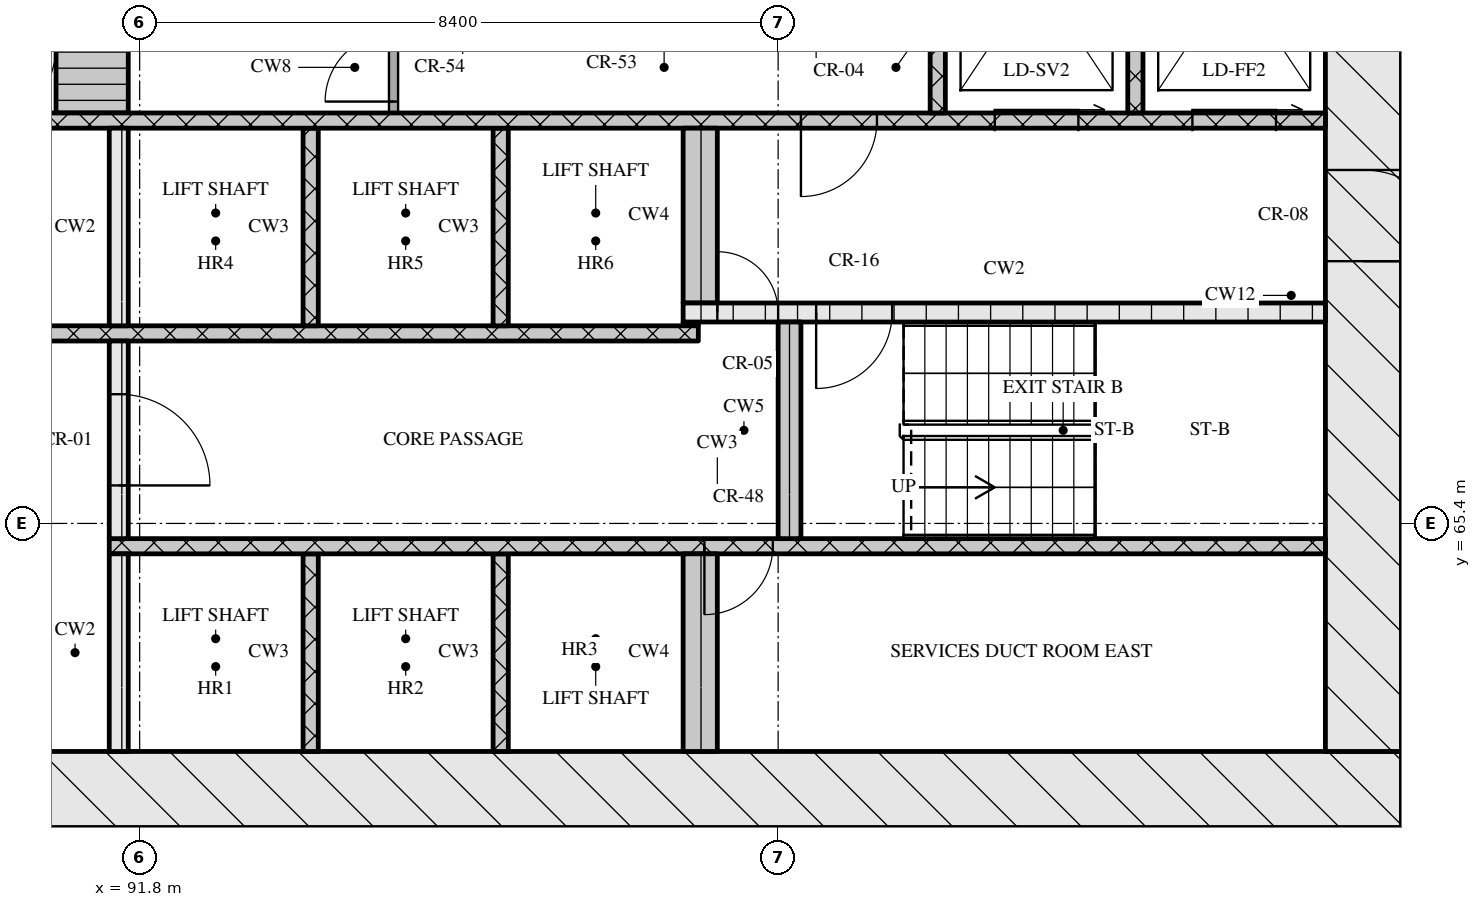
"""IFC4 building model, lengths in metres.
Left out: names, types, materials, properties, quantities, classifications, styles, units other than length and angle.
Written with IfcOpenShell. Run it as: python <this file> out.ifc"""

import sys

from ifc_helpers import new_model, si_unit, direction, frame, frame_2d, origin, place, context, subcontext, project, spatial, rectangle, extrude, element, fill, save


model = new_model("IFC4")
c1 = context("Model", 3, precision=1e-05, world=origin(), true_north=direction((0.0, 1.0)))
c2 = subcontext(c1, "Body", "Model", "MODEL_VIEW")
j1 = project(units=[si_unit("LENGTHUNIT", "METRE"), si_unit("PLANEANGLEUNIT", "RADIAN")], contexts=[c1])
p1 = place(None, origin())
s1 = spatial("IfcSite", under=j1, at=p1, CompositionType="ELEMENT")
p2 = place(p1, origin())
s2 = spatial("IfcBuilding", under=s1, at=p2, CompositionType="ELEMENT")
p3 = place(p2, frame((0.0, 0.0, 120.45)))
s3 = spatial("IfcBuildingStorey", under=s2, at=p3, CompositionType="ELEMENT", Elevation=120.45)
p4 = place(p3, frame((66.8, 61.9, 0.0), z_axis=(0.0, 0.0, 1.0), x_axis=(1.0, 0.0, 0.0)))
e1 = element("IfcWall", 1, at=p4, inside=s3, PredefinedType="SOLIDWALL", context=c2, shape_type="SweptSolid", body=[
    extrude(rectangle(XDim=41.6, YDim=1.0, at=frame_2d((20.8, 0.0))), origin(), (0.0, 0.0, 1.0), 3.32),
])
p5 = place(p4, frame((21.15, 0.0, 0.0)))
e2 = element("IfcOpeningElement", 2, at=p5, cuts=e1, PredefinedType="OPENING", context=c2, shape_type="SweptSolid", body=[
    extrude(rectangle(XDim=1.8, YDim=2.1, at=frame_2d((0.9, 1.05))), frame((0.0, 0.51, 0.0), z_axis=(0.0, -1.0, 0.0), x_axis=(1.0, 0.0, 0.0)), (0.0, 0.0, 1.0), 1.02),
])
p6 = place(p3, frame((107.9, 62.4, 0.0), z_axis=(0.0, 0.0, 1.0), x_axis=(0.0, 1.0, 0.0)))
e3 = element("IfcWall", 3, at=p6, inside=s3, PredefinedType="SOLIDWALL", context=c2, shape_type="SweptSolid", body=[
    extrude(rectangle(XDim=12.0, YDim=1.0, at=frame_2d((6.0, 0.0))), origin(), (0.0, 0.0, 1.0), 3.32),
])
p7 = place(p6, frame((6.45, 0.0, 0.0)))
e4 = element("IfcOpeningElement", 4, at=p7, cuts=e3, PredefinedType="OPENING", context=c2, shape_type="SweptSolid", body=[
    extrude(rectangle(XDim=1.2, YDim=2.1, at=frame_2d((0.6, 1.05))), frame((0.0, 0.51, 0.0), z_axis=(0.0, -1.0, 0.0), x_axis=(1.0, 0.0, 0.0)), (0.0, 0.0, 1.0), 1.02),
])
p8 = place(p3, frame((91.525, 62.4, 0.0), z_axis=(0.0, 0.0, 1.0), x_axis=(0.0, 1.0, 0.0)))
e5 = element("IfcWall", 5, at=p8, inside=s3, PredefinedType="SOLIDWALL", context=c2, shape_type="SweptSolid", body=[
    extrude(rectangle(XDim=2.6, YDim=0.25, at=frame_2d((1.3, 0.0))), origin(), (0.0, 0.0, 1.0), 3.32),
])
for number, where, z_axis, x_axis in (
    (6, (94.05, 62.4, 0.0), (0.0, 0.0, 1.0), (0.0, 1.0, 0.0)),
    (7, (96.55, 62.4, 0.0), (0.0, 0.0, 1.0), (0.0, 1.0, 0.0)),
):
    element("IfcWall", number, at=place(p3, frame(where, z_axis=z_axis, x_axis=x_axis)), inside=s3, PredefinedType="SOLIDWALL", context=c2, shape_type="SweptSolid", body=[
        extrude(rectangle(XDim=2.6, YDim=0.2, at=frame_2d((1.3, 0.0))), origin(), (0.0, 0.0, 1.0), 3.32),
    ])
p9 = place(p3, frame((99.175, 62.4, 0.0), z_axis=(0.0, 0.0, 1.0), x_axis=(0.0, 1.0, 0.0)))
e8 = element("IfcWall", 8, at=p9, inside=s3, PredefinedType="SOLIDWALL", context=c2, shape_type="SweptSolid", body=[
    extrude(rectangle(XDim=2.6, YDim=0.45, at=frame_2d((1.3, 0.0))), origin(), (0.0, 0.0, 1.0), 3.32),
])
p10 = place(p3, frame((91.4, 65.1, 0.0), z_axis=(0.0, 0.0, 1.0), x_axis=(1.0, 0.0, 0.0)))
e9 = element("IfcWall", 9, at=p10, inside=s3, PredefinedType="SOLIDWALL", context=c2, shape_type="SweptSolid", body=[
    extrude(rectangle(XDim=16.0, YDim=0.2, at=frame_2d((8.0, 0.0))), origin(), (0.0, 0.0, 1.0), 3.32),
])
p11 = place(p10, frame((7.83, 0.0, 0.0)))
e10 = element("IfcOpeningElement", 10, at=p11, cuts=e9, PredefinedType="OPENING", context=c2, shape_type="SweptSolid", body=[
    extrude(rectangle(XDim=0.9, YDim=2.1, at=frame_2d((0.45, 1.05))), frame((0.0, 0.11, 0.0), z_axis=(0.0, -1.0, 0.0), x_axis=(1.0, 0.0, 0.0)), (0.0, 0.0, 1.0), 0.22),
])
p12 = place(p3, frame((91.525, 65.2, 0.0), z_axis=(0.0, 0.0, 1.0), x_axis=(0.0, 1.0, 0.0)))
e11 = element("IfcWall", 11, at=p12, inside=s3, PredefinedType="SOLIDWALL", context=c2, shape_type="SweptSolid", body=[
    extrude(rectangle(XDim=2.6, YDim=0.25, at=frame_2d((1.3, 0.0))), origin(), (0.0, 0.0, 1.0), 3.32),
])
p13 = place(p12, frame((0.7, 0.0, 0.0)))
e12 = element("IfcOpeningElement", 12, at=p13, cuts=e11, PredefinedType="OPENING", context=c2, shape_type="SweptSolid", body=[
    extrude(rectangle(XDim=1.2, YDim=2.1, at=frame_2d((0.6, 1.05))), frame((0.0, 0.135, 0.0), z_axis=(0.0, -1.0, 0.0), x_axis=(1.0, 0.0, 0.0)), (0.0, 0.0, 1.0), 0.27),
])
p14 = place(p3, frame((100.35, 65.2, 0.0), z_axis=(0.0, 0.0, 1.0), x_axis=(0.0, 1.0, 0.0)))
e13 = element("IfcWall", 13, at=p14, inside=s3, PredefinedType="SOLIDWALL", context=c2, shape_type="SweptSolid", body=[
    extrude(rectangle(XDim=2.85, YDim=0.3, at=frame_2d((1.425, 0.0))), origin(), (0.0, 0.0, 1.0), 3.32),
])
p15 = place(p3, frame((76.05, 67.9, 0.0), z_axis=(0.0, 0.0, 1.0), x_axis=(1.0, 0.0, 0.0)))
e14 = element("IfcWall", 14, at=p15, inside=s3, PredefinedType="SOLIDWALL", context=c2, shape_type="SweptSolid", body=[
    extrude(rectangle(XDim=23.1, YDim=0.2, at=frame_2d((11.55, 0.0))), origin(), (0.0, 0.0, 1.0), 3.32),
])
p16 = place(p15, frame((0.6, 0.0, 0.0)))
e15 = element("IfcOpeningElement", 15, at=p16, cuts=e14, PredefinedType="OPENING", context=c2, shape_type="SweptSolid", body=[
    extrude(rectangle(XDim=1.1, YDim=2.1, at=frame_2d((0.55, 1.05))), frame((0.0, 0.11, 0.0), z_axis=(0.0, -1.0, 0.0), x_axis=(1.0, 0.0, 0.0)), (0.0, 0.0, 1.0), 0.22),
])
p17 = place(p15, frame((3.1, 0.0, 0.0)))
e16 = element("IfcOpeningElement", 16, at=p17, cuts=e14, PredefinedType="OPENING", context=c2, shape_type="SweptSolid", body=[
    extrude(rectangle(XDim=1.1, YDim=2.1, at=frame_2d((0.55, 1.05))), frame((0.0, 0.11, 0.0), z_axis=(0.0, -1.0, 0.0), x_axis=(1.0, 0.0, 0.0)), (0.0, 0.0, 1.0), 0.22),
])
p18 = place(p15, frame((5.6, 0.0, 0.0)))
e17 = element("IfcOpeningElement", 17, at=p18, cuts=e14, PredefinedType="OPENING", context=c2, shape_type="SweptSolid", body=[
    extrude(rectangle(XDim=1.1, YDim=2.1, at=frame_2d((0.55, 1.05))), frame((0.0, 0.11, 0.0), z_axis=(0.0, -1.0, 0.0), x_axis=(1.0, 0.0, 0.0)), (0.0, 0.0, 1.0), 0.22),
])
p19 = place(p15, frame((8.45, 0.0, 0.0)))
e18 = element("IfcOpeningElement", 18, at=p19, cuts=e14, PredefinedType="OPENING", context=c2, shape_type="SweptSolid", body=[
    extrude(rectangle(XDim=0.9, YDim=2.1, at=frame_2d((0.45, 1.05))), frame((0.0, 0.11, 0.0), z_axis=(0.0, -1.0, 0.0), x_axis=(1.0, 0.0, 0.0)), (0.0, 0.0, 1.0), 0.22),
])
p20 = place(p15, frame((10.91, 0.0, 0.0)))
e19 = element("IfcOpeningElement", 19, at=p20, cuts=e14, PredefinedType="OPENING", context=c2, shape_type="SweptSolid", body=[
    extrude(rectangle(XDim=0.9, YDim=2.1, at=frame_2d((0.45, 1.05))), frame((0.0, 0.11, 0.0), z_axis=(0.0, -1.0, 0.0), x_axis=(1.0, 0.0, 0.0)), (0.0, 0.0, 1.0), 0.22),
])
p21 = place(p15, frame((13.55, 0.0, 0.0)))
e20 = element("IfcOpeningElement", 20, at=p21, cuts=e14, PredefinedType="OPENING", context=c2, shape_type="SweptSolid", body=[
    extrude(rectangle(XDim=1.0, YDim=2.1, at=frame_2d((0.5, 1.05))), frame((0.0, 0.11, 0.0), z_axis=(0.0, -1.0, 0.0), x_axis=(1.0, 0.0, 0.0)), (0.0, 0.0, 1.0), 0.22),
])
p22 = place(p3, frame((91.525, 68.0, 0.0), z_axis=(0.0, 0.0, 1.0), x_axis=(0.0, 1.0, 0.0)))
e21 = element("IfcWall", 21, at=p22, inside=s3, PredefinedType="SOLIDWALL", context=c2, shape_type="SweptSolid", body=[
    extrude(rectangle(XDim=2.6, YDim=0.25, at=frame_2d((1.3, 0.0))), origin(), (0.0, 0.0, 1.0), 3.32),
])
for number, where, z_axis, x_axis in (
    (22, (94.05, 68.0, 0.0), (0.0, 0.0, 1.0), (0.0, 1.0, 0.0)),
    (23, (96.55, 68.0, 0.0), (0.0, 0.0, 1.0), (0.0, 1.0, 0.0)),
):
    element("IfcWall", number, at=place(p3, frame(where, z_axis=z_axis, x_axis=x_axis)), inside=s3, PredefinedType="SOLIDWALL", context=c2, shape_type="SweptSolid", body=[
        extrude(rectangle(XDim=2.6, YDim=0.2, at=frame_2d((1.3, 0.0))), origin(), (0.0, 0.0, 1.0), 3.32),
    ])
p23 = place(p3, frame((98.95, 68.025, 0.0), z_axis=(0.0, 0.0, 1.0), x_axis=(1.0, 0.0, 0.0)))
e24 = element("IfcWall", 24, at=p23, inside=s3, PredefinedType="SOLIDWALL", context=c2, shape_type="SweptSolid", body=[
    extrude(rectangle(XDim=0.2, YDim=0.05, at=frame_2d((0.1, 0.0))), origin(), (0.0, 0.0, 1.0), 3.32),
])
p24 = place(p3, frame((98.95, 68.175, 0.0), z_axis=(0.0, 0.0, 1.0), x_axis=(1.0, 0.0, 0.0)))
e25 = element("IfcWall", 25, at=p24, inside=s3, PredefinedType="SOLIDWALL", context=c2, shape_type="SweptSolid", body=[
    extrude(rectangle(XDim=8.45, YDim=0.25, at=frame_2d((4.225, 0.0))), origin(), (0.0, 0.0, 1.0), 3.32),
])
p25 = place(p24, frame((0.45, 0.0, 0.0)))
e26 = element("IfcOpeningElement", 26, at=p25, cuts=e25, PredefinedType="OPENING", context=c2, shape_type="SweptSolid", body=[
    extrude(rectangle(XDim=0.8, YDim=2.1, at=frame_2d((0.4, 1.05))), frame((0.0, 0.135, 0.0), z_axis=(0.0, -1.0, 0.0), x_axis=(1.0, 0.0, 0.0)), (0.0, 0.0, 1.0), 0.27),
])
p26 = place(p24, frame((1.75, 0.0, 0.0)))
e27 = element("IfcOpeningElement", 27, at=p26, cuts=e25, PredefinedType="OPENING", context=c2, shape_type="SweptSolid", body=[
    extrude(rectangle(XDim=1.0, YDim=2.1, at=frame_2d((0.5, 1.05))), frame((0.0, 0.135, 0.0), z_axis=(0.0, -1.0, 0.0), x_axis=(1.0, 0.0, 0.0)), (0.0, 0.0, 1.0), 0.27),
])
p27 = place(p3, frame((99.175, 68.3, 0.0), z_axis=(0.0, 0.0, 1.0), x_axis=(0.0, 1.0, 0.0)))
e28 = element("IfcWall", 28, at=p27, inside=s3, PredefinedType="SOLIDWALL", context=c2, shape_type="SweptSolid", body=[
    extrude(rectangle(XDim=2.3, YDim=0.45, at=frame_2d((1.15, 0.0))), origin(), (0.0, 0.0, 1.0), 3.32),
])
p28 = place(p3, frame((67.8, 70.7, 0.0), z_axis=(0.0, 0.0, 1.0), x_axis=(1.0, 0.0, 0.0)))
e29 = element("IfcWall", 29, at=p28, inside=s3, PredefinedType="SOLIDWALL", context=c2, shape_type="SweptSolid", body=[
    extrude(rectangle(XDim=39.6, YDim=0.2, at=frame_2d((19.8, 0.0))), origin(), (0.0, 0.0, 1.0), 3.32),
])
p29 = place(p28, frame((0.65, 0.0, 0.0)))
e30 = element("IfcOpeningElement", 30, at=p29, cuts=e29, PredefinedType="OPENING", context=c2, shape_type="SweptSolid", body=[
    extrude(rectangle(XDim=1.1, YDim=2.1, at=frame_2d((0.55, 1.05))), frame((0.0, 0.11, 0.0), z_axis=(0.0, -1.0, 0.0), x_axis=(1.0, 0.0, 0.0)), (0.0, 0.0, 1.0), 0.22),
])
p30 = place(p28, frame((3.25, 0.0, 0.0)))
e31 = element("IfcOpeningElement", 31, at=p30, cuts=e29, PredefinedType="OPENING", context=c2, shape_type="SweptSolid", body=[
    extrude(rectangle(XDim=1.1, YDim=2.1, at=frame_2d((0.55, 1.05))), frame((0.0, 0.11, 0.0), z_axis=(0.0, -1.0, 0.0), x_axis=(1.0, 0.0, 0.0)), (0.0, 0.0, 1.0), 0.22),
])
p31 = place(p28, frame((5.9, 0.0, 0.0)))
e32 = element("IfcOpeningElement", 32, at=p31, cuts=e29, PredefinedType="OPENING", context=c2, shape_type="SweptSolid", body=[
    extrude(rectangle(XDim=1.0, YDim=2.1, at=frame_2d((0.5, 1.05))), frame((0.0, 0.11, 0.0), z_axis=(0.0, -1.0, 0.0), x_axis=(1.0, 0.0, 0.0)), (0.0, 0.0, 1.0), 0.22),
])
p32 = place(p28, frame((21.7, 0.0, 0.0)))
e33 = element("IfcOpeningElement", 33, at=p32, cuts=e29, PredefinedType="OPENING", context=c2, shape_type="SweptSolid", body=[
    extrude(rectangle(XDim=1.0, YDim=2.1, at=frame_2d((0.5, 1.05))), frame((0.0, 0.11, 0.0), z_axis=(0.0, -1.0, 0.0), x_axis=(1.0, 0.0, 0.0)), (0.0, 0.0, 1.0), 0.22),
])
p33 = place(p28, frame((32.7, 0.0, 0.0)))
e34 = element("IfcOpeningElement", 34, at=p33, cuts=e29, PredefinedType="OPENING", context=c2, shape_type="SweptSolid", body=[
    extrude(rectangle(XDim=1.0, YDim=2.1, at=frame_2d((0.5, 1.05))), frame((0.0, 0.11, 0.0), z_axis=(0.0, -1.0, 0.0), x_axis=(1.0, 0.0, 0.0)), (0.0, 0.0, 1.0), 0.22),
])
p34 = place(p28, frame((35.25, 0.0, 0.0)))
e35 = element("IfcOpeningElement", 35, at=p34, cuts=e29, PredefinedType="OPENING", context=c2, shape_type="SweptSolid", body=[
    extrude(rectangle(XDim=1.1, YDim=2.1, at=frame_2d((0.55, 1.05))), frame((0.0, 0.11, 0.0), z_axis=(0.0, -1.0, 0.0), x_axis=(1.0, 0.0, 0.0)), (0.0, 0.0, 1.0), 0.22),
])
p35 = place(p28, frame((37.85, 0.0, 0.0)))
e36 = element("IfcOpeningElement", 36, at=p35, cuts=e29, PredefinedType="OPENING", context=c2, shape_type="SweptSolid", body=[
    extrude(rectangle(XDim=1.1, YDim=2.1, at=frame_2d((0.55, 1.05))), frame((0.0, 0.11, 0.0), z_axis=(0.0, -1.0, 0.0), x_axis=(1.0, 0.0, 0.0)), (0.0, 0.0, 1.0), 0.22),
])
p36 = place(p3, frame((91.175, 70.8, 0.0), z_axis=(0.0, 0.0, 1.0), x_axis=(0.0, 1.0, 0.0)))
e37 = element("IfcWall", 37, at=p36, inside=s3, PredefinedType="SOLIDWALL", context=c2, shape_type="SweptSolid", body=[
    extrude(rectangle(XDim=2.95, YDim=0.95, at=frame_2d((1.475, 0.0))), origin(), (0.0, 0.0, 1.0), 3.32),
])
p37 = place(p3, frame((95.14, 70.8, 0.0), z_axis=(0.0, 0.0, 1.0), x_axis=(0.0, 1.0, 0.0)))
e38 = element("IfcWall", 38, at=p37, inside=s3, PredefinedType="PARTITIONING", context=c2, shape_type="SweptSolid", body=[
    extrude(rectangle(XDim=1.2, YDim=0.12, at=frame_2d((0.6, 0.0))), origin(), (0.0, 0.0, 1.0), 3.32),
])
p38 = place(p37, frame((0.15, 0.0, 0.0)))
e39 = element("IfcOpeningElement", 39, at=p38, cuts=e38, PredefinedType="OPENING", context=c2, shape_type="SweptSolid", body=[
    extrude(rectangle(XDim=0.9, YDim=2.1, at=frame_2d((0.45, 1.05))), frame((0.0, 0.07, 0.0), z_axis=(0.0, -1.0, 0.0), x_axis=(1.0, 0.0, 0.0)), (0.0, 0.0, 1.0), 0.14),
])
p39 = place(p3, frame((102.3, 70.8, 0.0), z_axis=(0.0, 0.0, 1.0), x_axis=(0.0, 1.0, 0.0)))
e40 = element("IfcWall", 40, at=p39, inside=s3, PredefinedType="SOLIDWALL", context=c2, shape_type="SweptSolid", body=[
    extrude(rectangle(XDim=1.2, YDim=0.2, at=frame_2d((0.6, 0.0))), origin(), (0.0, 0.0, 1.0), 3.32),
])
p40 = place(p3, frame((104.9, 70.8, 0.0), z_axis=(0.0, 0.0, 1.0), x_axis=(0.0, 1.0, 0.0)))
e41 = element("IfcWall", 41, at=p40, inside=s3, PredefinedType="SOLIDWALL", context=c2, shape_type="SweptSolid", body=[
    extrude(rectangle(XDim=3.6, YDim=0.2, at=frame_2d((1.8, 0.0))), origin(), (0.0, 0.0, 1.0), 3.32),
])
p41 = place(p11, origin())
e42 = element("IfcDoor", 42, at=p41, inside=s3, OperationType="SINGLE_SWING_RIGHT", PredefinedType="DOOR", context=c2, shape_type="SweptSolid", body=[
    extrude(rectangle(XDim=0.9, YDim=2.1, at=frame_2d((0.45, 1.05))), frame((0.0, 0.025, 0.0), z_axis=(0.0, -1.0, 0.0), x_axis=(1.0, 0.0, 0.0)), (0.0, 0.0, 1.0), 0.05),
])
fill(e10, e42)
p42 = place(p13, origin())
e43 = element("IfcDoor", 43, at=p42, inside=s3, OperationType="SINGLE_SWING_RIGHT", PredefinedType="DOOR", context=c2, shape_type="SweptSolid", body=[
    extrude(rectangle(XDim=1.2, YDim=2.1, at=frame_2d((0.6, 1.05))), frame((0.0, 0.025, 0.0), z_axis=(0.0, -1.0, 0.0), x_axis=(1.0, 0.0, 0.0)), (0.0, 0.0, 1.0), 0.05),
])
fill(e12, e43)
p43 = place(p25, origin())
e44 = element("IfcDoor", 44, at=p43, inside=s3, OperationType="SINGLE_SWING_LEFT", PredefinedType="DOOR", context=c2, shape_type="SweptSolid", body=[
    extrude(rectangle(XDim=0.8, YDim=2.1, at=frame_2d((0.4, 1.05))), frame((0.0, 0.025, 0.0), z_axis=(0.0, -1.0, 0.0), x_axis=(1.0, 0.0, 0.0)), (0.0, 0.0, 1.0), 0.05),
])
fill(e26, e44)
p44 = place(p26, origin())
e45 = element("IfcDoor", 45, at=p44, inside=s3, OperationType="SINGLE_SWING_RIGHT", PredefinedType="DOOR", context=c2, shape_type="SweptSolid", body=[
    extrude(rectangle(XDim=1.0, YDim=2.1, at=frame_2d((0.5, 1.05))), frame((0.0, 0.025, 0.0), z_axis=(0.0, -1.0, 0.0), x_axis=(1.0, 0.0, 0.0)), (0.0, 0.0, 1.0), 0.05),
])
fill(e27, e45)
p45 = place(p7, origin())
e46 = element("IfcDoor", 46, at=p45, inside=s3, OperationType="SINGLE_SWING_RIGHT", PredefinedType="DOOR", context=c2, shape_type="SweptSolid", body=[
    extrude(rectangle(XDim=1.2, YDim=2.1, at=frame_2d((0.6, 1.05))), frame((0.0, 0.025, 0.0), z_axis=(0.0, -1.0, 0.0), x_axis=(1.0, 0.0, 0.0)), (0.0, 0.0, 1.0), 0.05),
])
fill(e4, e46)
p46 = place(p33, origin())
e47 = element("IfcDoor", 47, at=p46, inside=s3, OperationType="SINGLE_SWING_RIGHT", PredefinedType="DOOR", context=c2, shape_type="SweptSolid", body=[
    extrude(rectangle(XDim=1.0, YDim=2.1, at=frame_2d((0.5, 1.05))), frame((0.0, 0.025, 0.0), z_axis=(0.0, -1.0, 0.0), x_axis=(1.0, 0.0, 0.0)), (0.0, 0.0, 1.0), 0.05),
])
fill(e34, e47)
p47 = place(p34, origin())
e48 = element("IfcDoor", 48, at=p47, inside=s3, OperationType="SLIDING_TO_RIGHT", PredefinedType="DOOR", context=c2, shape_type="SweptSolid", body=[
    extrude(rectangle(XDim=1.1, YDim=2.1, at=frame_2d((0.55, 1.05))), frame((0.0, 0.025, 0.0), z_axis=(0.0, -1.0, 0.0), x_axis=(1.0, 0.0, 0.0)), (0.0, 0.0, 1.0), 0.05),
])
fill(e35, e48)
p48 = place(p35, origin())
e49 = element("IfcDoor", 49, at=p48, inside=s3, OperationType="SLIDING_TO_RIGHT", PredefinedType="DOOR", context=c2, shape_type="SweptSolid", body=[
    extrude(rectangle(XDim=1.1, YDim=2.1, at=frame_2d((0.55, 1.05))), frame((0.0, 0.025, 0.0), z_axis=(0.0, -1.0, 0.0), x_axis=(1.0, 0.0, 0.0)), (0.0, 0.0, 1.0), 0.05),
])
fill(e36, e49)
p49 = place(p38, origin())
e50 = element("IfcDoor", 50, at=p49, inside=s3, OperationType="SINGLE_SWING_LEFT", PredefinedType="DOOR", context=c2, shape_type="SweptSolid", body=[
    extrude(rectangle(XDim=0.9, YDim=2.1, at=frame_2d((0.45, 1.05))), frame((0.0, 0.025, 0.0), z_axis=(0.0, -1.0, 0.0), x_axis=(1.0, 0.0, 0.0)), (0.0, 0.0, 1.0), 0.05),
])
fill(e39, e50)
save(model, sys.argv[1])
